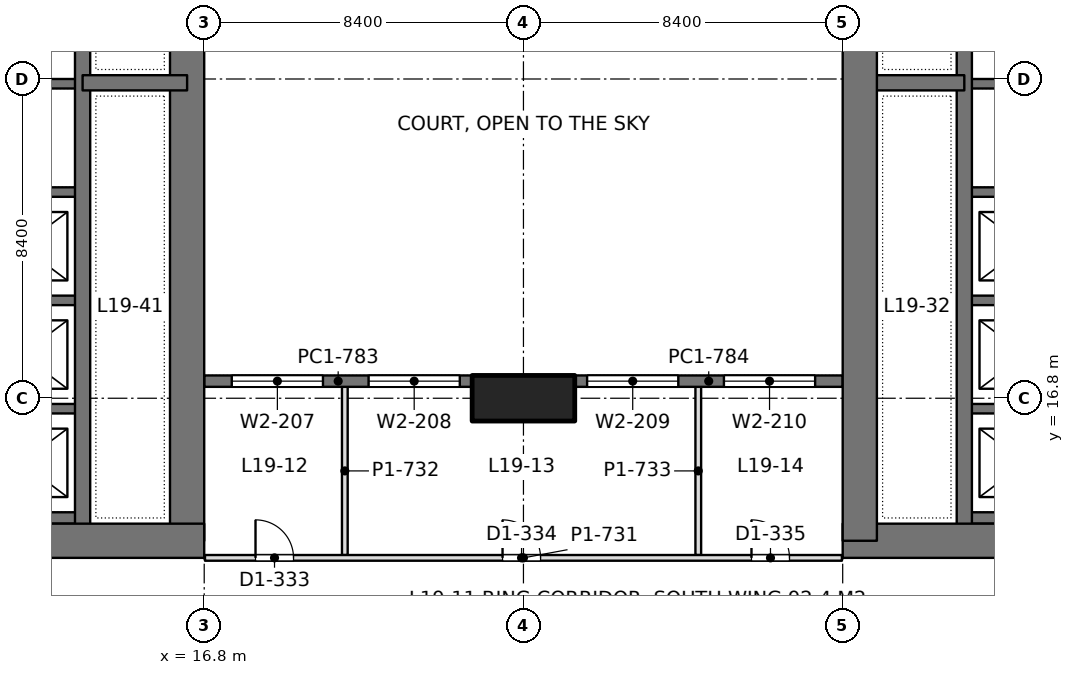
"""IFC4 building model, lengths in metres.
Left out: names, types, materials, properties, quantities, classifications, styles, units other than length and angle.
Written with IfcOpenShell. Run it as: python <this file> out.ifc"""

import sys

from ifc_helpers import new_model, si_unit, direction, frame, frame_2d, origin, origin_2d, place, context, subcontext, project, spatial, rectangle, extrude, element, fill, save


model = new_model("IFC4")
c1 = context("Model", 3, precision=1e-05, world=origin(), true_north=direction((0.0, 1.0)))
c2 = subcontext(c1, "Body", "Model", "MODEL_VIEW")
j1 = project(units=[si_unit("LENGTHUNIT", "METRE"), si_unit("PLANEANGLEUNIT", "RADIAN")], contexts=[c1])
p1 = place(None, origin())
s1 = spatial("IfcSite", under=j1, at=p1, CompositionType="ELEMENT")
p2 = place(p1, origin())
s2 = spatial("IfcBuilding", under=s1, at=p2, CompositionType="ELEMENT")
p3 = place(p2, frame((0.0, 0.0, 86.4)))
s3 = spatial("IfcBuildingStorey", under=s2, at=p3, CompositionType="ELEMENT", Elevation=86.4)
p4 = place(p3, frame((25.2, 16.8, 0.0), z_axis=(0.0, 0.0, 1.0), x_axis=(1.0, 0.0, 0.0)))
e1 = element("IfcColumn", 1, at=p4, inside=s3, PredefinedType="COLUMN", context=c2, shape_type="SweptSolid", body=[
    extrude(rectangle(XDim=2.7, YDim=1.2, at=origin_2d()), origin(), (0.0, 0.0, 1.0), 4.5),
])
p5 = place(p3, frame((-1.2, 13.05, 0.0), z_axis=(0.0, 0.0, 1.0), x_axis=(1.0, 0.0, 0.0)))
e2 = element("IfcWall", 2, at=p5, inside=s3, PredefinedType="SHEAR", context=c2, shape_type="SweptSolid", body=[
    extrude(rectangle(XDim=18.0, YDim=0.9, at=frame_2d((9.0, 0.0))), origin(), (0.0, 0.0, 1.0), 4.5),
])
p6 = place(p5, frame((8.95, 0.0, 0.0)))
e3 = element("IfcOpeningElement", 3, at=p6, cuts=e2, PredefinedType="OPENING", context=c2, shape_type="SweptSolid", body=[
    extrude(rectangle(XDim=1.8, YDim=2.4, at=frame_2d((0.9, 1.2))), frame((0.0, 0.46, 0.0), z_axis=(0.0, -1.0, 0.0), x_axis=(1.0, 0.0, 0.0)), (0.0, 0.0, 1.0), 0.92),
])
p7 = place(p3, frame((16.35, 13.05, 0.0), z_axis=(0.0, 0.0, 1.0), x_axis=(0.0, 1.0, 0.0)))
e4 = element("IfcWall", 4, at=p7, inside=s3, PredefinedType="SHEAR", context=c2, shape_type="SweptSolid", body=[
    extrude(rectangle(XDim=24.3, YDim=0.9, at=frame_2d((12.15, 0.0))), origin(), (0.0, 0.0, 1.0), 4.5),
])
p8 = place(p3, frame((13.6, 13.05, 0.0), z_axis=(0.0, 0.0, 1.0), x_axis=(0.0, 1.0, 0.0)))
e5 = element("IfcWall", 5, at=p8, inside=s3, PredefinedType="SHEAR", context=c2, shape_type="SweptSolid", body=[
    extrude(rectangle(XDim=24.3, YDim=0.4, at=frame_2d((12.15, 0.0))), origin(), (0.0, 0.0, 1.0), 4.5),
])
p9 = place(p3, frame((13.6, 25.1, 0.0), z_axis=(0.0, 0.0, 1.0), x_axis=(1.0, 0.0, 0.0)))
e6 = element("IfcWall", 6, at=p9, inside=s3, PredefinedType="SHEAR", context=c2, shape_type="SweptSolid", body=[
    extrude(rectangle(XDim=2.75, YDim=0.4, at=frame_2d((1.375, 0.0))), origin(), (0.0, 0.0, 1.0), 4.5),
])
p10 = place(p3, frame((10.4, 13.65, 0.0), z_axis=(0.0, 0.0, 1.0), x_axis=(1.0, 0.0, 0.0)))
e7 = element("IfcWall", 7, at=p10, inside=s3, PredefinedType="SHEAR", context=c2, shape_type="SweptSolid", body=[
    extrude(rectangle(XDim=3.2, YDim=0.3, at=frame_2d((1.6, 0.0))), origin(), (0.0, 0.0, 1.0), 4.5),
])
for number, where, z_axis, x_axis in (
    (8, (10.4, 16.525, 0.0), (0.0, 0.0, 1.0), (1.0, 0.0, 0.0)),
    (9, (10.4, 19.375, 0.0), (0.0, 0.0, 1.0), (1.0, 0.0, 0.0)),
    (10, (10.4, 22.225, 0.0), (0.0, 0.0, 1.0), (1.0, 0.0, 0.0)),
    (11, (10.4, 25.075, 0.0), (0.0, 0.0, 1.0), (1.0, 0.0, 0.0)),
):
    element("IfcWall", number, at=place(p3, frame(where, z_axis=z_axis, x_axis=x_axis)), inside=s3, PredefinedType="SHEAR", context=c2, shape_type="SweptSolid", body=[
        extrude(rectangle(XDim=3.2, YDim=0.25, at=frame_2d((1.6, 0.0))), origin(), (0.0, 0.0, 1.0), 4.5),
    ])
p11 = place(p3, frame((33.6, 13.05, 0.0), z_axis=(0.0, 0.0, 1.0), x_axis=(1.0, 0.0, 0.0)))
e12 = element("IfcWall", 12, at=p11, inside=s3, PredefinedType="SHEAR", context=c2, shape_type="SweptSolid", body=[
    extrude(rectangle(XDim=18.0, YDim=0.9, at=frame_2d((9.0, 0.0))), origin(), (0.0, 0.0, 1.0), 4.5),
])
p12 = place(p11, frame((7.25, 0.0, 0.0)))
e13 = element("IfcOpeningElement", 13, at=p12, cuts=e12, PredefinedType="OPENING", context=c2, shape_type="SweptSolid", body=[
    extrude(rectangle(XDim=1.8, YDim=2.4, at=frame_2d((0.9, 1.2))), frame((0.0, 0.46, 0.0), z_axis=(0.0, -1.0, 0.0), x_axis=(1.0, 0.0, 0.0)), (0.0, 0.0, 1.0), 0.92),
])
p13 = place(p3, frame((34.05, 13.05, 0.0), z_axis=(0.0, 0.0, 1.0), x_axis=(0.0, 1.0, 0.0)))
e14 = element("IfcWall", 14, at=p13, inside=s3, PredefinedType="SHEAR", context=c2, shape_type="SweptSolid", body=[
    extrude(rectangle(XDim=24.3, YDim=0.9, at=frame_2d((12.15, 0.0))), origin(), (0.0, 0.0, 1.0), 4.5),
])
p14 = place(p3, frame((36.8, 13.05, 0.0), z_axis=(0.0, 0.0, 1.0), x_axis=(0.0, 1.0, 0.0)))
e15 = element("IfcWall", 15, at=p14, inside=s3, PredefinedType="SHEAR", context=c2, shape_type="SweptSolid", body=[
    extrude(rectangle(XDim=24.3, YDim=0.4, at=frame_2d((12.15, 0.0))), origin(), (0.0, 0.0, 1.0), 4.5),
])
p15 = place(p3, frame((36.8, 25.1, 0.0), z_axis=(0.0, 0.0, 1.0), x_axis=(-1.0, 0.0, 0.0)))
e16 = element("IfcWall", 16, at=p15, inside=s3, PredefinedType="SHEAR", context=c2, shape_type="SweptSolid", body=[
    extrude(rectangle(XDim=2.75, YDim=0.4, at=frame_2d((1.375, 0.0))), origin(), (0.0, 0.0, 1.0), 4.5),
])
p16 = place(p3, frame((40.0, 13.65, 0.0), z_axis=(0.0, 0.0, 1.0), x_axis=(-1.0, 0.0, 0.0)))
e17 = element("IfcWall", 17, at=p16, inside=s3, PredefinedType="SHEAR", context=c2, shape_type="SweptSolid", body=[
    extrude(rectangle(XDim=3.2, YDim=0.3, at=frame_2d((1.6, 0.0))), origin(), (0.0, 0.0, 1.0), 4.5),
])
for number, where, z_axis, x_axis in (
    (18, (40.0, 16.525, 0.0), (0.0, 0.0, 1.0), (-1.0, 0.0, 0.0)),
    (19, (40.0, 19.375, 0.0), (0.0, 0.0, 1.0), (-1.0, 0.0, 0.0)),
    (20, (40.0, 22.225, 0.0), (0.0, 0.0, 1.0), (-1.0, 0.0, 0.0)),
    (21, (40.0, 25.075, 0.0), (0.0, 0.0, 1.0), (-1.0, 0.0, 0.0)),
):
    element("IfcWall", number, at=place(p3, frame(where, z_axis=z_axis, x_axis=x_axis)), inside=s3, PredefinedType="SHEAR", context=c2, shape_type="SweptSolid", body=[
        extrude(rectangle(XDim=3.2, YDim=0.25, at=frame_2d((1.6, 0.0))), origin(), (0.0, 0.0, 1.0), 4.5),
    ])
p17 = place(p3, frame((16.8, 17.25, 0.0), z_axis=(0.0, 0.0, 1.0), x_axis=(1.0, 0.0, 0.0)))
e22 = element("IfcWall", 22, at=p17, inside=s3, PredefinedType="SOLIDWALL", context=c2, shape_type="SweptSolid", body=[
    extrude(rectangle(XDim=7.05, YDim=0.3, at=frame_2d((3.525, 0.0))), origin(), (0.0, 0.0, 1.0), 4.3),
])
p18 = place(p17, frame((0.725, 0.0, 0.9)))
e23 = element("IfcOpeningElement", 23, at=p18, cuts=e22, PredefinedType="OPENING", context=c2, shape_type="SweptSolid", body=[
    extrude(rectangle(XDim=2.4, YDim=1.9, at=frame_2d((1.2, 0.95))), frame((0.0, 0.16, 0.0), z_axis=(0.0, -1.0, 0.0), x_axis=(1.0, 0.0, 0.0)), (0.0, 0.0, 1.0), 0.32),
])
p19 = place(p17, frame((4.325, 0.0, 0.9)))
e24 = element("IfcOpeningElement", 24, at=p19, cuts=e22, PredefinedType="OPENING", context=c2, shape_type="SweptSolid", body=[
    extrude(rectangle(XDim=2.4, YDim=1.9, at=frame_2d((1.2, 0.95))), frame((0.0, 0.16, 0.0), z_axis=(0.0, -1.0, 0.0), x_axis=(1.0, 0.0, 0.0)), (0.0, 0.0, 1.0), 0.32),
])
p20 = place(p3, frame((26.55, 17.25, 0.0), z_axis=(0.0, 0.0, 1.0), x_axis=(1.0, 0.0, 0.0)))
e25 = element("IfcWall", 25, at=p20, inside=s3, PredefinedType="SOLIDWALL", context=c2, shape_type="SweptSolid", body=[
    extrude(rectangle(XDim=7.05, YDim=0.3, at=frame_2d((3.525, 0.0))), origin(), (0.0, 0.0, 1.0), 4.3),
])
p21 = place(p20, frame((0.325, 0.0, 0.9)))
e26 = element("IfcOpeningElement", 26, at=p21, cuts=e25, PredefinedType="OPENING", context=c2, shape_type="SweptSolid", body=[
    extrude(rectangle(XDim=2.4, YDim=1.9, at=frame_2d((1.2, 0.95))), frame((0.0, 0.16, 0.0), z_axis=(0.0, -1.0, 0.0), x_axis=(1.0, 0.0, 0.0)), (0.0, 0.0, 1.0), 0.32),
])
p22 = place(p20, frame((3.925, 0.0, 0.9)))
e27 = element("IfcOpeningElement", 27, at=p22, cuts=e25, PredefinedType="OPENING", context=c2, shape_type="SweptSolid", body=[
    extrude(rectangle(XDim=2.4, YDim=1.9, at=frame_2d((1.2, 0.95))), frame((0.0, 0.16, 0.0), z_axis=(0.0, -1.0, 0.0), x_axis=(1.0, 0.0, 0.0)), (0.0, 0.0, 1.0), 0.32),
])
for number, where, z_axis, x_axis in (
    (28, (20.5, 12.674, 0.0), (0.0, 0.0, 1.0), (0.0, 1.0, 0.0)),
    (29, (29.8, 12.674, 0.0), (0.0, 0.0, 1.0), (0.0, 1.0, 0.0)),
):
    element("IfcWall", number, at=place(p3, frame(where, z_axis=z_axis, x_axis=x_axis)), inside=s3, PredefinedType="PARTITIONING", context=c2, shape_type="SweptSolid", body=[
        extrude(rectangle(XDim=4.428, YDim=0.15, at=frame_2d((2.214, 0.0))), origin(), (0.0, 0.0, 1.0), 3.61),
    ])
p23 = place(p3, frame((16.82, 12.6, 0.0), z_axis=(0.0, 0.0, 1.0), x_axis=(1.0, 0.0, 0.0)))
e30 = element("IfcWall", 30, at=p23, inside=s3, PredefinedType="PARTITIONING", context=c2, shape_type="SweptSolid", body=[
    extrude(rectangle(XDim=16.76, YDim=0.15, at=frame_2d((8.38, 0.0))), origin(), (0.0, 0.0, 1.0), 3.6),
])
p24 = place(p23, frame((1.33, 0.0, 0.0)))
e31 = element("IfcOpeningElement", 31, at=p24, cuts=e30, PredefinedType="OPENING", context=c2, shape_type="SweptSolid", body=[
    extrude(rectangle(XDim=1.0, YDim=2.2, at=frame_2d((0.5, 1.1))), frame((0.0, 0.085, 0.0), z_axis=(0.0, -1.0, 0.0), x_axis=(1.0, 0.0, 0.0)), (0.0, 0.0, 1.0), 0.17),
])
p25 = place(p23, frame((7.83, 0.0, 0.0)))
e32 = element("IfcOpeningElement", 32, at=p25, cuts=e30, PredefinedType="OPENING", context=c2, shape_type="SweptSolid", body=[
    extrude(rectangle(XDim=1.0, YDim=2.2, at=frame_2d((0.5, 1.1))), frame((0.0, 0.085, 0.0), z_axis=(0.0, -1.0, 0.0), x_axis=(1.0, 0.0, 0.0)), (0.0, 0.0, 1.0), 0.17),
])
p26 = place(p23, frame((14.38, 0.0, 0.0)))
e33 = element("IfcOpeningElement", 33, at=p26, cuts=e30, PredefinedType="OPENING", context=c2, shape_type="SweptSolid", body=[
    extrude(rectangle(XDim=1.0, YDim=2.2, at=frame_2d((0.5, 1.1))), frame((0.0, 0.085, 0.0), z_axis=(0.0, -1.0, 0.0), x_axis=(1.0, 0.0, 0.0)), (0.0, 0.0, 1.0), 0.17),
])
p27 = place(p18, origin())
e34 = element("IfcWindow", 34, at=p27, inside=s3, PartitioningType="SINGLE_PANEL", PredefinedType="WINDOW", context=c2, shape_type="SweptSolid", body=[
    extrude(rectangle(XDim=2.4, YDim=1.9, at=frame_2d((1.2, 0.95))), frame((0.0, 0.03, 0.0), z_axis=(0.0, -1.0, 0.0), x_axis=(1.0, 0.0, 0.0)), (0.0, 0.0, 1.0), 0.06),
])
fill(e23, e34)
p28 = place(p19, origin())
e35 = element("IfcWindow", 35, at=p28, inside=s3, PartitioningType="SINGLE_PANEL", PredefinedType="WINDOW", context=c2, shape_type="SweptSolid", body=[
    extrude(rectangle(XDim=2.4, YDim=1.9, at=frame_2d((1.2, 0.95))), frame((0.0, 0.03, 0.0), z_axis=(0.0, -1.0, 0.0), x_axis=(1.0, 0.0, 0.0)), (0.0, 0.0, 1.0), 0.06),
])
fill(e24, e35)
p29 = place(p21, origin())
e36 = element("IfcWindow", 36, at=p29, inside=s3, PartitioningType="SINGLE_PANEL", PredefinedType="WINDOW", context=c2, shape_type="SweptSolid", body=[
    extrude(rectangle(XDim=2.4, YDim=1.9, at=frame_2d((1.2, 0.95))), frame((0.0, 0.03, 0.0), z_axis=(0.0, -1.0, 0.0), x_axis=(1.0, 0.0, 0.0)), (0.0, 0.0, 1.0), 0.06),
])
fill(e26, e36)
p30 = place(p22, origin())
e37 = element("IfcWindow", 37, at=p30, inside=s3, PartitioningType="SINGLE_PANEL", PredefinedType="WINDOW", context=c2, shape_type="SweptSolid", body=[
    extrude(rectangle(XDim=2.4, YDim=1.9, at=frame_2d((1.2, 0.95))), frame((0.0, 0.03, 0.0), z_axis=(0.0, -1.0, 0.0), x_axis=(1.0, 0.0, 0.0)), (0.0, 0.0, 1.0), 0.06),
])
fill(e27, e37)
p31 = place(p24, origin())
e38 = element("IfcDoor", 38, at=p31, inside=s3, OperationType="SINGLE_SWING_LEFT", PredefinedType="DOOR", context=c2, shape_type="SweptSolid", body=[
    extrude(rectangle(XDim=1.0, YDim=2.2, at=frame_2d((0.5, 1.1))), frame((0.0, 0.025, 0.0), z_axis=(0.0, -1.0, 0.0), x_axis=(1.0, 0.0, 0.0)), (0.0, 0.0, 1.0), 0.05),
])
fill(e31, e38)
p32 = place(p25, origin())
e39 = element("IfcDoor", 39, at=p32, inside=s3, OperationType="SINGLE_SWING_LEFT", PredefinedType="DOOR", context=c2, shape_type="SweptSolid", body=[
    extrude(rectangle(XDim=1.0, YDim=2.2, at=frame_2d((0.5, 1.1))), frame((0.0, 0.025, 0.0), z_axis=(0.0, -1.0, 0.0), x_axis=(1.0, 0.0, 0.0)), (0.0, 0.0, 1.0), 0.05),
])
fill(e32, e39)
p33 = place(p26, origin())
e40 = element("IfcDoor", 40, at=p33, inside=s3, OperationType="SINGLE_SWING_LEFT", PredefinedType="DOOR", context=c2, shape_type="SweptSolid", body=[
    extrude(rectangle(XDim=1.0, YDim=2.2, at=frame_2d((0.5, 1.1))), frame((0.0, 0.025, 0.0), z_axis=(0.0, -1.0, 0.0), x_axis=(1.0, 0.0, 0.0)), (0.0, 0.0, 1.0), 0.05),
])
fill(e33, e40)
save(model, sys.argv[1])
